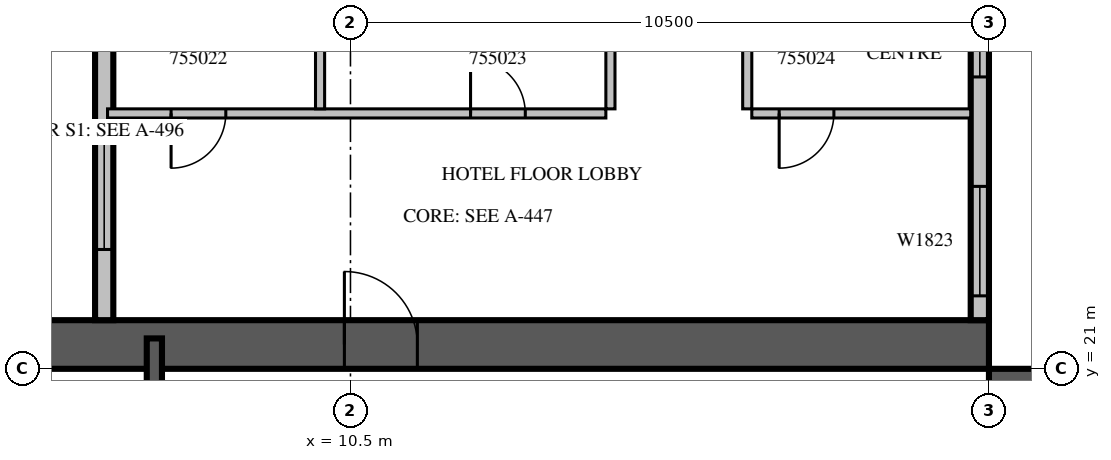
"""IFC4 building model, lengths in metres.
Left out: names, types, materials, properties, quantities, classifications, styles, units other than length and angle.
Written with IfcOpenShell. Run it as: python <this file> out.ifc"""

import sys

from ifc_helpers import new_model, si_unit, direction, frame, frame_2d, origin, place, context, subcontext, project, spatial, rectangle, extrude, source, transform, mapped, element, fill, save


model = new_model("IFC4")
c1 = context("Model", 3, precision=1e-05, world=origin(), true_north=direction((0.0, 1.0)))
c2 = subcontext(c1, "Body", "Model", "MODEL_VIEW")
j1 = project(units=[si_unit("LENGTHUNIT", "METRE"), si_unit("PLANEANGLEUNIT", "RADIAN")], contexts=[c1])
p1 = place(None, origin())
s1 = spatial("IfcSite", under=j1, at=p1, CompositionType="ELEMENT")
p2 = place(p1, origin())
s2 = spatial("IfcBuilding", under=s1, at=p2, CompositionType="ELEMENT")
p3 = place(p2, frame((0.0, 0.0, 242.4)))
s3 = spatial("IfcBuildingStorey", under=s2, at=p3, CompositionType="ELEMENT", Elevation=242.4)
m1 = source(origin(), c2, "Body", "SweptSolid", [
    extrude(rectangle(XDim=16.8, YDim=0.8, at=frame_2d((8.4, 0.0))), origin(), (0.0, 0.0, 1.0), 3.8),
])
p4 = place(p3, frame((21.4, 4.2, 0.0), z_axis=(0.0, 0.0, 1.0), x_axis=(0.0, 1.0, 0.0)))
e1 = element("IfcWall", 1, at=p4, inside=s3, PredefinedType="SHEAR", context=c2, shape_type="MappedRepresentation", body=[
    mapped(m1, transform((0.0, 0.0, 0.0), scale=1.0)),
])
m2 = source(origin(), c2, "Body", "SweptSolid", [
    extrude(rectangle(XDim=2.2, YDim=2.1, at=frame_2d((1.1, 1.05))), frame((0.0, 0.41, 0.0), z_axis=(0.0, -1.0, 0.0), x_axis=(1.0, 0.0, 0.0)), (0.0, 0.0, 1.0), 0.82),
])
p5 = place(p4, frame((4.2, 0.0, 0.0)))
e2 = element("IfcOpeningElement", 2, at=p5, cuts=e1, PredefinedType="OPENING", context=c2, shape_type="MappedRepresentation", body=[
    mapped(m2, transform((0.0, 0.0, 0.0), scale=1.0)),
])
m3 = source(origin(), c2, "Body", "SweptSolid", [
    extrude(rectangle(XDim=1.2, YDim=2.1, at=frame_2d((0.6, 1.05))), frame((0.0, 0.41, 0.0), z_axis=(0.0, -1.0, 0.0), x_axis=(1.0, 0.0, 0.0)), (0.0, 0.0, 1.0), 0.82),
])
p6 = place(p4, frame((14.7, 0.0, 0.0)))
e3 = element("IfcOpeningElement", 3, at=p6, cuts=e1, PredefinedType="OPENING", context=c2, shape_type="MappedRepresentation", body=[
    mapped(m3, transform((0.0, 0.0, 0.0), scale=1.0)),
])
p7 = place(p3, frame((4.2, 21.4, 0.0), z_axis=(0.0, 0.0, 1.0), x_axis=(1.0, 0.0, 0.0)))
e4 = element("IfcWall", 4, at=p7, inside=s3, PredefinedType="SHEAR", context=c2, shape_type="MappedRepresentation", body=[
    mapped(m1, transform((0.0, 0.0, 0.0), scale=1.0)),
])
p8 = place(p7, frame((6.2, 0.0, 0.0)))
e5 = element("IfcOpeningElement", 5, at=p8, cuts=e4, PredefinedType="OPENING", context=c2, shape_type="MappedRepresentation", body=[
    mapped(m3, transform((0.0, 0.0, 0.0), scale=1.0)),
])
m4 = source(origin(), c2, "Body", "SweptSolid", [
    extrude(rectangle(XDim=7.2, YDim=0.3, at=frame_2d((3.6, 0.0))), origin(), (0.0, 0.0, 1.0), 3.4),
])
p9 = place(p3, frame((20.85, 21.8, 0.0), z_axis=(0.0, 0.0, 1.0), x_axis=(0.0, 1.0, 0.0)))
e6 = element("IfcWall", 6, at=p9, inside=s3, PredefinedType="STANDARD", context=c2, shape_type="MappedRepresentation", body=[
    mapped(m4, transform((0.0, 0.0, 0.0), scale=1.0)),
])
m5 = source(origin(), c2, "Body", "SweptSolid", [
    extrude(rectangle(XDim=1.8, YDim=2.3, at=frame_2d((0.9, 1.15))), frame((0.0, 0.16, 0.0), z_axis=(0.0, -1.0, 0.0), x_axis=(1.0, 0.0, 0.0)), (0.0, 0.0, 1.0), 0.32),
])
p10 = place(p9, frame((0.4, 0.0, 0.6)))
e7 = element("IfcOpeningElement", 7, at=p10, cuts=e6, PredefinedType="OPENING", context=c2, shape_type="MappedRepresentation", body=[
    mapped(m5, transform((0.0, 0.0, 0.0), scale=1.0)),
])
m6 = source(origin(), c2, "Body", "SweptSolid", [
    extrude(rectangle(XDim=3.0, YDim=2.3, at=frame_2d((1.5, 1.15))), frame((0.0, 0.16, 0.0), z_axis=(0.0, -1.0, 0.0), x_axis=(1.0, 0.0, 0.0)), (0.0, 0.0, 1.0), 0.32),
])
p11 = place(p9, frame((4.0, 0.0, 0.6)))
e8 = element("IfcOpeningElement", 8, at=p11, cuts=e6, PredefinedType="OPENING", context=c2, shape_type="MappedRepresentation", body=[
    mapped(m6, transform((0.0, 0.0, 0.0), scale=1.0)),
])
m7 = source(origin(), c2, "Body", "SweptSolid", [
    extrude(rectangle(XDim=16.6, YDim=0.3, at=frame_2d((8.3, 0.0))), origin(), (0.0, 0.0, 1.0), 3.4),
])
p12 = place(p3, frame((6.45, 38.4, 0.0), z_axis=(0.0, 0.0, 1.0), x_axis=(0.0, -1.0, 0.0)))
e9 = element("IfcWall", 9, at=p12, inside=s3, PredefinedType="STANDARD", context=c2, shape_type="MappedRepresentation", body=[
    mapped(m7, transform((0.0, 0.0, 0.0), scale=1.0)),
])
p13 = place(p12, frame((1.15, 0.0, 0.6)))
e10 = element("IfcOpeningElement", 10, at=p13, cuts=e9, PredefinedType="OPENING", context=c2, shape_type="MappedRepresentation", body=[
    mapped(m5, transform((0.0, 0.0, 0.0), scale=1.0)),
])
p14 = place(p12, frame((9.438, 0.0, 0.6)))
e11 = element("IfcOpeningElement", 11, at=p14, cuts=e9, PredefinedType="OPENING", context=c2, shape_type="MappedRepresentation", body=[
    mapped(m5, transform((0.0, 0.0, 0.0), scale=1.0)),
])
p15 = place(p12, frame((13.637, 0.0, 0.6)))
e12 = element("IfcOpeningElement", 12, at=p15, cuts=e9, PredefinedType="OPENING", context=c2, shape_type="MappedRepresentation", body=[
    mapped(m5, transform((0.0, 0.0, 0.0), scale=1.0)),
])
m8 = source(origin(), c2, "Body", "SweptSolid", [
    extrude(rectangle(XDim=1.0, YDim=2.1, at=frame_2d((0.5, 1.05))), frame((0.0, 0.16, 0.0), z_axis=(0.0, -1.0, 0.0), x_axis=(1.0, 0.0, 0.0)), (0.0, 0.0, 1.0), 0.32),
])
p16 = place(p12, frame((5.45, 0.0, 0.0)))
e13 = element("IfcOpeningElement", 13, at=p16, cuts=e9, PredefinedType="OPENING", context=c2, shape_type="MappedRepresentation", body=[
    mapped(m8, transform((0.0, 0.0, 0.0), scale=1.0)),
])
m9 = source(origin(), c2, "Body", "SweptSolid", [
    extrude(rectangle(XDim=6.6, YDim=0.25, at=frame_2d((3.3, 0.0))), origin(), (0.0, 0.0, 1.0), 3.4),
])
p17 = place(p3, frame((7.275, 14.9, 0.0), z_axis=(0.0, 0.0, 1.0), x_axis=(0.0, 1.0, 0.0)))
e14 = element("IfcWall", 14, at=p17, inside=s3, PredefinedType="SOLIDWALL", context=c2, shape_type="MappedRepresentation", body=[
    mapped(m9, transform((0.0, 0.0, 0.0), scale=1.0)),
])
m10 = source(origin(), c2, "Body", "SweptSolid", [
    extrude(rectangle(XDim=1.1, YDim=2.1, at=frame_2d((0.55, 1.05))), frame((0.0, 0.135, 0.0), z_axis=(0.0, -1.0, 0.0), x_axis=(1.0, 0.0, 0.0)), (0.0, 0.0, 1.0), 0.27),
])
p18 = place(p17, frame((0.15, 0.0, 0.0)))
e15 = element("IfcOpeningElement", 15, at=p18, cuts=e14, PredefinedType="OPENING", context=c2, shape_type="MappedRepresentation", body=[
    mapped(m10, transform((0.0, 0.0, 0.0), scale=1.0)),
])
m11 = source(origin(), c2, "Body", "SweptSolid", [
    extrude(rectangle(XDim=8.195, YDim=0.15, at=frame_2d((4.098, 0.0))), origin(), (0.0, 0.0, 1.0), 3.4),
])
p19 = place(p3, frame((6.505, 25.2, 0.0), z_axis=(0.0, 0.0, 1.0), x_axis=(1.0, 0.0, 0.0)))
e16 = element("IfcWall", 16, at=p19, inside=s3, PredefinedType="PARTITIONING", context=c2, shape_type="MappedRepresentation", body=[
    mapped(m11, transform((0.0, 0.0, 0.0), scale=1.0)),
])
m12 = source(origin(), c2, "Body", "SweptSolid", [
    extrude(rectangle(XDim=0.9, YDim=2.1, at=frame_2d((0.45, 1.05))), frame((0.0, 0.085, 0.0), z_axis=(0.0, -1.0, 0.0), x_axis=(1.0, 0.0, 0.0)), (0.0, 0.0, 1.0), 0.17),
])
p20 = place(p19, frame((1.045, 0.0, 0.0)))
e17 = element("IfcOpeningElement", 17, at=p20, cuts=e16, PredefinedType="OPENING", context=c2, shape_type="MappedRepresentation", body=[
    mapped(m12, transform((0.0, 0.0, 0.0), scale=1.0)),
])
p21 = place(p19, frame((5.97, 0.0, 0.0)))
e18 = element("IfcOpeningElement", 18, at=p21, cuts=e16, PredefinedType="OPENING", context=c2, shape_type="MappedRepresentation", body=[
    mapped(m12, transform((0.0, 0.0, 0.0), scale=1.0)),
])
m13 = source(origin(), c2, "Body", "SweptSolid", [
    extrude(rectangle(XDim=3.6, YDim=0.15, at=frame_2d((1.8, 0.0))), origin(), (0.0, 0.0, 1.0), 3.4),
])
p22 = place(p3, frame((17.1, 25.2, 0.0), z_axis=(0.0, 0.0, 1.0), x_axis=(1.0, 0.0, 0.0)))
e19 = element("IfcWall", 19, at=p22, inside=s3, PredefinedType="PARTITIONING", context=c2, shape_type="MappedRepresentation", body=[
    mapped(m13, transform((0.0, 0.0, 0.0), scale=1.0)),
])
p23 = place(p22, frame((0.45, 0.0, 0.0)))
e20 = element("IfcOpeningElement", 20, at=p23, cuts=e19, PredefinedType="OPENING", context=c2, shape_type="MappedRepresentation", body=[
    mapped(m12, transform((0.0, 0.0, 0.0), scale=1.0)),
])
m14 = source(origin(), c2, "Body", "SweptSolid", [
    extrude(rectangle(XDim=4.05, YDim=0.15, at=frame_2d((2.025, 0.0))), origin(), (0.0, 0.0, 1.0), 3.4),
])
for number, where, z_axis, x_axis in (
    (21, (10.0, 25.275, 0.0), (0.0, 0.0, 1.0), (0.0, 1.0, 0.0)),
    (22, (14.775, 25.275, 0.0), (0.0, 0.0, 1.0), (0.0, 1.0, 0.0)),
    (23, (17.025, 29.325, 0.0), (0.0, 0.0, 1.0), (0.0, -1.0, 0.0)),
):
    element("IfcWall", number, at=place(p3, frame(where, z_axis=z_axis, x_axis=x_axis)), inside=s3, PredefinedType="PARTITIONING", context=c2, shape_type="MappedRepresentation", body=[
        mapped(m14, transform((0.0, 0.0, 0.0), scale=1.0)),
    ])
m15 = source(origin(), c2, "Body", "SweptSolid", [
    extrude(rectangle(XDim=1.8, YDim=2.3, at=frame_2d((0.9, 1.15))), frame((0.0, 0.03, 0.0), z_axis=(0.0, -1.0, 0.0), x_axis=(1.0, 0.0, 0.0)), (0.0, 0.0, 1.0), 0.06),
])
p24 = place(p10, origin())
e24 = element("IfcWindow", 24, at=p24, inside=s3, PartitioningType="SINGLE_PANEL", PredefinedType="WINDOW", context=c2, shape_type="MappedRepresentation", body=[
    mapped(m15, transform((0.0, 0.0, 0.0), scale=1.0)),
])
fill(e7, e24)
m16 = source(origin(), c2, "Body", "SweptSolid", [
    extrude(rectangle(XDim=3.0, YDim=2.3, at=frame_2d((1.5, 1.15))), frame((0.0, 0.03, 0.0), z_axis=(0.0, -1.0, 0.0), x_axis=(1.0, 0.0, 0.0)), (0.0, 0.0, 1.0), 0.06),
])
p25 = place(p11, origin())
e25 = element("IfcWindow", 25, at=p25, inside=s3, PartitioningType="SINGLE_PANEL", PredefinedType="WINDOW", context=c2, shape_type="MappedRepresentation", body=[
    mapped(m16, transform((0.0, 0.0, 0.0), scale=1.0)),
])
fill(e8, e25)
p26 = place(p15, origin())
e26 = element("IfcWindow", 26, at=p26, inside=s3, PartitioningType="SINGLE_PANEL", PredefinedType="WINDOW", context=c2, shape_type="MappedRepresentation", body=[
    mapped(m15, transform((0.0, 0.0, 0.0), scale=1.0)),
])
fill(e12, e26)
m17 = source(origin(), c2, "Body", "SweptSolid", [
    extrude(rectangle(XDim=1.2, YDim=2.1, at=frame_2d((0.6, 1.05))), frame((0.0, 0.025, 0.0), z_axis=(0.0, -1.0, 0.0), x_axis=(1.0, 0.0, 0.0)), (0.0, 0.0, 1.0), 0.05),
])
p27 = place(p8, origin())
e27 = element("IfcDoor", 27, at=p27, inside=s3, OperationType="SINGLE_SWING_LEFT", PredefinedType="DOOR", context=c2, shape_type="MappedRepresentation", body=[
    mapped(m17, transform((0.0, 0.0, 0.0), scale=1.0)),
])
fill(e5, e27)
m18 = source(origin(), c2, "Body", "SweptSolid", [
    extrude(rectangle(XDim=0.9, YDim=2.1, at=frame_2d((0.45, 1.05))), frame((0.0, 0.025, 0.0), z_axis=(0.0, -1.0, 0.0), x_axis=(1.0, 0.0, 0.0)), (0.0, 0.0, 1.0), 0.05),
])
p28 = place(p20, origin())
e28 = element("IfcDoor", 28, at=p28, inside=s3, OperationType="SINGLE_SWING_RIGHT", PredefinedType="DOOR", context=c2, shape_type="MappedRepresentation", body=[
    mapped(m18, transform((0.0, 0.0, 0.0), scale=1.0)),
])
fill(e17, e28)
p29 = place(p21, origin())
e29 = element("IfcDoor", 29, at=p29, inside=s3, OperationType="SINGLE_SWING_LEFT", PredefinedType="DOOR", context=c2, shape_type="MappedRepresentation", body=[
    mapped(m18, transform((0.0, 0.0, 0.0), scale=1.0)),
])
fill(e18, e29)
p30 = place(p23, origin())
e30 = element("IfcDoor", 30, at=p30, inside=s3, OperationType="SINGLE_SWING_RIGHT", PredefinedType="DOOR", context=c2, shape_type="MappedRepresentation", body=[
    mapped(m18, transform((0.0, 0.0, 0.0), scale=1.0)),
])
fill(e20, e30)
save(model, sys.argv[1])
